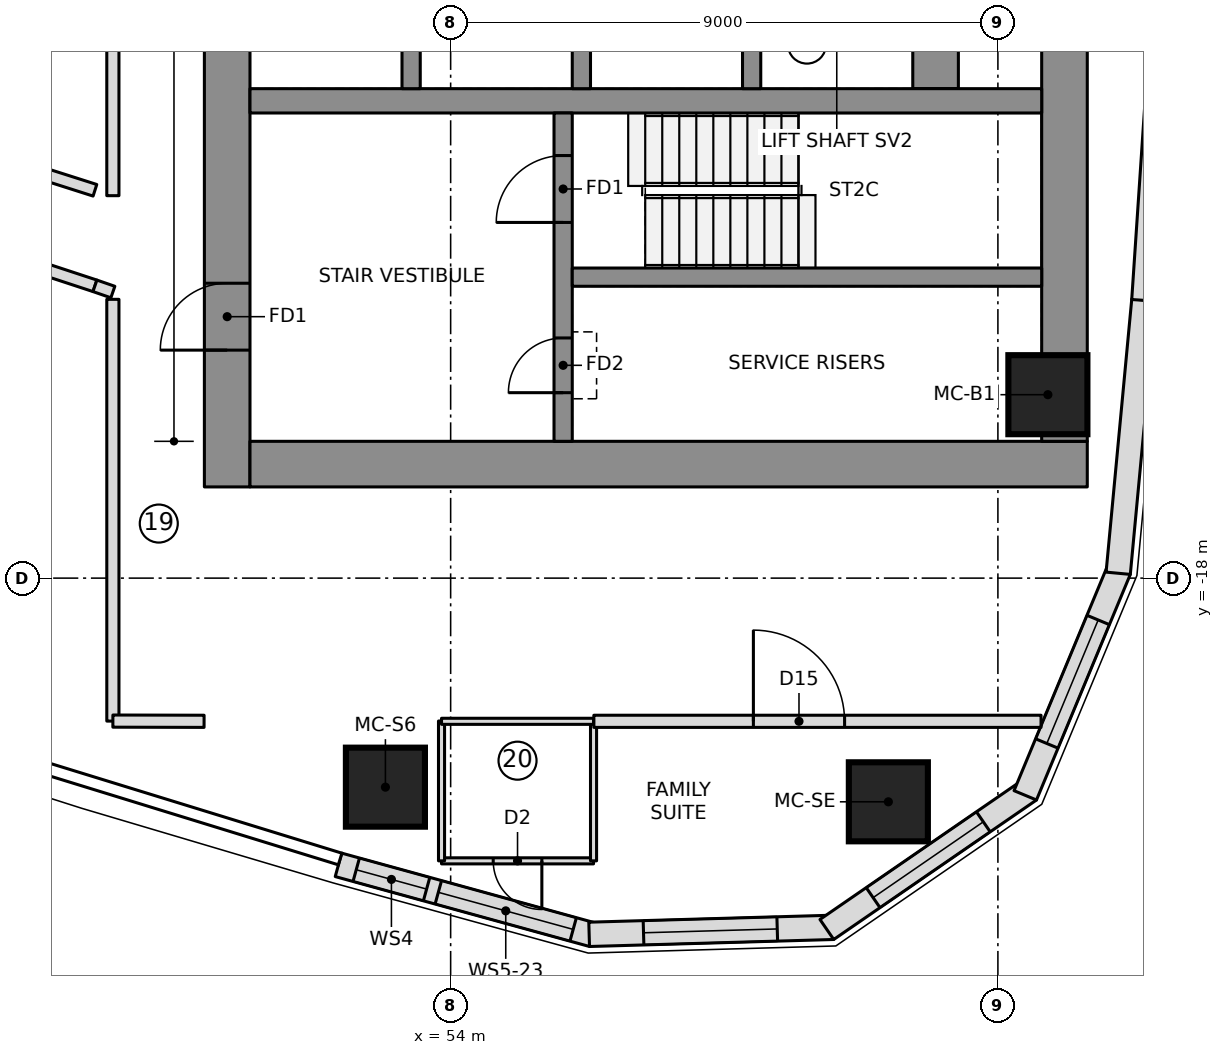
"""IFC4 building model, lengths in metres.
Left out: names, types, materials, properties, quantities, classifications, styles, units other than length and angle.
Written with IfcOpenShell. Run it as: python <this file> out.ifc"""

import sys

from ifc_helpers import new_model, si_unit, direction, frame, frame_2d, origin, origin_2d, place, context, subcontext, project, spatial, polyline, rectangle, outline, extrude, element, fill, save


model = new_model("IFC4")
c1 = context("Model", 3, precision=1e-05, world=origin(), true_north=direction((0.0, 1.0)))
c2 = subcontext(c1, "Body", "Model", "MODEL_VIEW")
j1 = project(units=[si_unit("LENGTHUNIT", "METRE"), si_unit("PLANEANGLEUNIT", "RADIAN")], contexts=[c1])
p1 = place(None, origin())
s1 = spatial("IfcSite", under=j1, at=p1, CompositionType="ELEMENT")
p2 = place(p1, origin())
s2 = spatial("IfcBuilding", under=s1, at=p2, CompositionType="ELEMENT")
p3 = place(p2, frame((0.0, 0.0, 175.5)))
s3 = spatial("IfcBuildingStorey", under=s2, at=p3, CompositionType="ELEMENT", Elevation=175.5)
p4 = place(p3, frame((50.325, -16.5, 0.0), z_axis=(0.0, 0.0, 1.0), x_axis=(0.0, 1.0, 0.0)))
e1 = element("IfcWall", 1, at=p4, inside=s3, PredefinedType="SHEAR", context=c2, shape_type="SweptSolid", body=[
    extrude(rectangle(XDim=9.85, YDim=0.75, at=frame_2d((4.925, 0.0))), origin(), (0.0, 0.0, 1.0), 3.55),
])
p5 = place(p4, frame((2.25, 0.0, 0.0)))
e2 = element("IfcOpeningElement", 2, at=p5, cuts=e1, PredefinedType="OPENING", context=c2, shape_type="SweptSolid", body=[
    extrude(rectangle(XDim=1.1, YDim=2.1, at=frame_2d((0.55, 1.05))), frame((0.0, 0.385, 0.0), z_axis=(0.0, -1.0, 0.0), x_axis=(1.0, 0.0, 0.0)), (0.0, 0.0, 1.0), 0.77),
])
p6 = place(p3, frame((50.7, -16.125, 0.0), z_axis=(0.0, 0.0, 1.0), x_axis=(1.0, 0.0, 0.0)))
e3 = element("IfcWall", 3, at=p6, inside=s3, PredefinedType="SHEAR", context=c2, shape_type="SweptSolid", body=[
    extrude(rectangle(XDim=13.77, YDim=0.75, at=frame_2d((6.885, 0.0))), origin(), (0.0, 0.0, 1.0), 3.55),
])
p7 = place(p3, frame((64.095, -15.75, 0.0), z_axis=(0.0, 0.0, 1.0), x_axis=(0.0, 1.0, 0.0)))
e4 = element("IfcWall", 4, at=p7, inside=s3, PredefinedType="SHEAR", context=c2, shape_type="SweptSolid", body=[
    extrude(rectangle(XDim=7.651, YDim=0.75, at=frame_2d((3.825, 0.0))), origin(), (0.0, 0.0, 1.0), 3.55),
])
p8 = place(p3, frame((61.975, -9.95, 0.0), z_axis=(0.0, 0.0, 1.0), x_axis=(0.0, 1.0, 0.0)))
e5 = element("IfcWall", 5, at=p8, inside=s3, PredefinedType="SHEAR", context=c2, shape_type="SweptSolid", body=[
    extrude(rectangle(XDim=19.9, YDim=0.75, at=frame_2d((9.95, 0.0))), origin(), (0.0, 0.0, 1.0), 3.55),
])
p9 = place(p3, frame((50.7, -10.15, 0.0), z_axis=(0.0, 0.0, 1.0), x_axis=(1.0, 0.0, 0.0)))
e6 = element("IfcWall", 6, at=p9, inside=s3, PredefinedType="SHEAR", context=c2, shape_type="SweptSolid", body=[
    extrude(rectangle(XDim=13.02, YDim=0.4, at=frame_2d((6.51, 0.0))), origin(), (0.0, 0.0, 1.0), 3.55),
])
for number, where, z_axis, x_axis in (
    (7, (53.35, -9.95, 0.0), (0.0, 0.0, 1.0), (0.0, 1.0, 0.0)),
    (8, (56.15, -9.95, 0.0), (0.0, 0.0, 1.0), (0.0, 1.0, 0.0)),
    (9, (58.95, -9.95, 0.0), (0.0, 0.0, 1.0), (0.0, 1.0, 0.0)),
):
    element("IfcWall", number, at=place(p3, frame(where, z_axis=z_axis, x_axis=x_axis)), inside=s3, PredefinedType="SHEAR", context=c2, shape_type="SweptSolid", body=[
        extrude(rectangle(XDim=3.0, YDim=0.3, at=frame_2d((1.5, 0.0))), origin(), (0.0, 0.0, 1.0), 3.55),
    ])
p10 = place(p3, frame((55.85, -15.75, 0.0), z_axis=(0.0, 0.0, 1.0), x_axis=(0.0, 1.0, 0.0)))
e10 = element("IfcWall", 10, at=p10, inside=s3, PredefinedType="SHEAR", context=c2, shape_type="SweptSolid", body=[
    extrude(rectangle(XDim=5.4, YDim=0.3, at=frame_2d((2.7, 0.0))), origin(), (0.0, 0.0, 1.0), 3.55),
])
p11 = place(p10, frame((3.6, 0.0, 0.0)))
e11 = element("IfcOpeningElement", 11, at=p11, cuts=e10, PredefinedType="OPENING", context=c2, shape_type="SweptSolid", body=[
    extrude(rectangle(XDim=1.1, YDim=2.1, at=frame_2d((0.55, 1.05))), frame((0.0, 0.16, 0.0), z_axis=(0.0, -1.0, 0.0), x_axis=(1.0, 0.0, 0.0)), (0.0, 0.0, 1.0), 0.32),
])
p12 = place(p10, frame((0.8, 0.0, 0.0)))
e12 = element("IfcOpeningElement", 12, at=p12, cuts=e10, PredefinedType="OPENING", context=c2, shape_type="SweptSolid", body=[
    extrude(rectangle(XDim=0.9, YDim=2.1, at=frame_2d((0.45, 1.05))), frame((0.0, 0.16, 0.0), z_axis=(0.0, -1.0, 0.0), x_axis=(1.0, 0.0, 0.0)), (0.0, 0.0, 1.0), 0.32),
])
p13 = place(p3, frame((56.0, -13.05, 0.0), z_axis=(0.0, 0.0, 1.0), x_axis=(1.0, 0.0, 0.0)))
e13 = element("IfcWall", 13, at=p13, inside=s3, PredefinedType="SHEAR", context=c2, shape_type="SweptSolid", body=[
    extrude(rectangle(XDim=7.72, YDim=0.3, at=frame_2d((3.86, 0.0))), origin(), (0.0, 0.0, 1.0), 3.55),
])
for number, where, z_axis, x_axis in (
    (14, (52.927, -21.438, 0.0), (0.0, 0.0, 1.0), (1.0, 0.0, 0.0)),
    (15, (61.198, -21.679, 0.0), (0.0, 0.0, 1.0), (1.0, 0.0, 0.0)),
    (16, (63.822, -14.983, 0.0), (0.0, 0.0, 1.0), (1.0, 0.0, 0.0)),
):
    element("IfcColumn", number, at=place(p3, frame(where, z_axis=z_axis, x_axis=x_axis)), inside=s3, PredefinedType="COLUMN", context=c2, shape_type="SweptSolid", body=[
        extrude(rectangle(XDim=1.3, YDim=1.3, at=origin_2d()), origin(), (0.0, 0.0, 1.0), 3.55),
    ])
p14 = place(p3, frame((52.155, -22.716, 0.0), z_axis=(0.0, 0.0, 1.0), x_axis=(0.964205755089, -0.265155165617, 0.0)))
e17 = element("IfcWall", 17, at=p14, inside=s3, PredefinedType="NOTDEFINED", context=c2, shape_type="SweptSolid", body=[
    extrude(outline(polyline([(0.0, -0.2), (4.337, -0.2), (4.277, 0.2), (0.0, 0.2), (0.0, -0.2)])), origin(), (0.0, 0.0, 1.0), 3.25),
])
p15 = place(p14, frame((0.303, 0.0, 0.9)))
e18 = element("IfcOpeningElement", 18, at=p15, cuts=e17, PredefinedType="OPENING", context=c2, shape_type="SweptSolid", body=[
    extrude(rectangle(XDim=1.2, YDim=1.8, at=frame_2d((0.6, 0.9))), frame((0.0, 0.21, 0.0), z_axis=(0.0, -1.0, 0.0), x_axis=(1.0, 0.0, 0.0)), (0.0, 0.0, 1.0), 0.42),
])
p16 = place(p14, frame((1.704, 0.0, 0.9)))
e19 = element("IfcOpeningElement", 19, at=p16, cuts=e17, PredefinedType="OPENING", context=c2, shape_type="SweptSolid", body=[
    extrude(rectangle(XDim=2.3, YDim=1.8, at=frame_2d((1.15, 0.9))), frame((0.0, 0.21, 0.0), z_axis=(0.0, -1.0, 0.0), x_axis=(1.0, 0.0, 0.0)), (0.0, 0.0, 1.0), 0.42),
])
p17 = place(p3, frame((56.308, -23.858, 0.0), z_axis=(0.0, 0.0, 1.0), x_axis=(0.999587920197, 0.028705222472, 0.0)))
e20 = element("IfcWall", 20, at=p17, inside=s3, PredefinedType="NOTDEFINED", context=c2, shape_type="SweptSolid", body=[
    extrude(outline(polyline([(-0.03, -0.2), (3.989, -0.2), (3.87, 0.2), (0.03, 0.2), (-0.03, -0.2)])), origin(), (0.0, 0.0, 1.0), 3.25),
])
p18 = place(p17, frame((0.865, 0.0, 0.6)))
e21 = element("IfcOpeningElement", 21, at=p18, cuts=e20, PredefinedType="OPENING", context=c2, shape_type="SweptSolid", body=[
    extrude(outline(polyline([(0.0, 1.35), (0.084, 1.771), (0.322, 2.128), (0.679, 2.366), (1.1, 2.45), (1.521, 2.366), (1.878, 2.128), (2.116, 1.771), (2.2, 1.35), (2.2, 1.1), (2.116, 0.679), (1.878, 0.322), (1.521, 0.084), (1.1, 0.0), (0.679, 0.084), (0.322, 0.322), (0.084, 0.679), (0.0, 1.1), (0.0, 1.35)])), frame((0.0, 0.21, 0.0), z_axis=(0.0, -1.0, 0.0), x_axis=(1.0, 0.0, 0.0)), (0.0, 0.0, 1.0), 0.42),
])
p19 = place(p3, frame((60.236, -23.745, 0.0), z_axis=(0.0, 0.0, 1.0), x_axis=(0.823806162588, 0.566871596115, 0.0)))
e22 = element("IfcWall", 22, at=p19, inside=s3, PredefinedType="NOTDEFINED", context=c2, shape_type="SweptSolid", body=[
    extrude(outline(polyline([(-0.059, -0.2), (3.988, -0.2), (3.87, 0.2), (0.059, 0.2), (-0.059, -0.2)])), origin(), (0.0, 0.0, 1.0), 3.25),
])
p20 = place(p19, frame((0.865, 0.0, 0.6)))
e23 = element("IfcOpeningElement", 23, at=p20, cuts=e22, PredefinedType="OPENING", context=c2, shape_type="SweptSolid", body=[
    extrude(outline(polyline([(0.0, 1.35), (0.084, 1.771), (0.322, 2.128), (0.679, 2.366), (1.1, 2.45), (1.521, 2.366), (1.878, 2.128), (2.116, 1.771), (2.2, 1.35), (2.2, 1.1), (2.116, 0.679), (1.878, 0.322), (1.521, 0.084), (1.1, 0.0), (0.679, 0.084), (0.322, 0.322), (0.084, 0.679), (0.0, 1.1), (0.0, 1.35)])), frame((0.0, 0.21, 0.0), z_axis=(0.0, -1.0, 0.0), x_axis=(1.0, 0.0, 0.0)), (0.0, 0.0, 1.0), 0.42),
])
p21 = place(p3, frame((63.472, -21.518, 0.0), z_axis=(0.0, 0.0, 1.0), x_axis=(0.383997619794, 0.923334082547, 0.0)))
e24 = element("IfcWall", 24, at=p21, inside=s3, PredefinedType="NOTDEFINED", context=c2, shape_type="SweptSolid", body=[
    extrude(outline(polyline([(-0.059, -0.2), (3.959, -0.2), (3.899, 0.2), (0.059, 0.2), (-0.059, -0.2)])), origin(), (0.0, 0.0, 1.0), 3.25),
])
p22 = place(p21, frame((0.865, 0.0, 0.6)))
e25 = element("IfcOpeningElement", 25, at=p22, cuts=e24, PredefinedType="OPENING", context=c2, shape_type="SweptSolid", body=[
    extrude(outline(polyline([(0.0, 1.35), (0.084, 1.771), (0.322, 2.128), (0.679, 2.366), (1.1, 2.45), (1.521, 2.366), (1.878, 2.128), (2.116, 1.771), (2.2, 1.35), (2.2, 1.1), (2.116, 0.679), (1.878, 0.322), (1.521, 0.084), (1.1, 0.0), (0.679, 0.084), (0.322, 0.322), (0.084, 0.679), (0.0, 1.1), (0.0, 1.35)])), frame((0.0, 0.21, 0.0), z_axis=(0.0, -1.0, 0.0), x_axis=(1.0, 0.0, 0.0)), (0.0, 0.0, 1.0), 0.42),
])
p23 = place(p3, frame((64.981, -17.89, 0.0), z_axis=(0.0, 0.0, 1.0), x_axis=(0.093605694738, 0.995609348044, 0.0)))
e26 = element("IfcWall", 26, at=p23, inside=s3, PredefinedType="NOTDEFINED", context=c2, shape_type="SweptSolid", body=[
    extrude(outline(polyline([(-0.03, -0.2), (4.484, -0.2), (4.478, 0.2), (0.03, 0.2), (-0.03, -0.2)])), origin(), (0.0, 0.0, 1.0), 3.25),
])
p24 = place(p3, frame((65.401, -13.429, 0.0), z_axis=(0.0, 0.0, 1.0), x_axis=(0.066905935948, 0.997759287471, 0.0)))
e27 = element("IfcWall", 27, at=p24, inside=s3, PredefinedType="NOTDEFINED", context=c2, shape_type="SweptSolid", body=[
    extrude(outline(polyline([(-0.003, -0.2), (4.484, -0.2), (4.478, 0.2), (0.003, 0.2), (-0.003, -0.2)])), origin(), (0.0, 0.0, 1.0), 3.25),
])
p25 = place(p3, frame((56.35, -22.65, 0.0), z_axis=(0.0, 0.0, 1.0), x_axis=(-1.0, 0.0, 0.0)))
e28 = element("IfcWall", 28, at=p25, inside=s3, PredefinedType="PARTITIONING", context=c2, shape_type="SweptSolid", body=[
    extrude(rectangle(XDim=2.5, YDim=0.1, at=frame_2d((1.25, 0.0))), origin(), (0.0, 0.0, 1.0), 3.25),
])
p26 = place(p25, frame((0.85, 0.0, 0.0)))
e29 = element("IfcOpeningElement", 29, at=p26, cuts=e28, PredefinedType="OPENING", context=c2, shape_type="SweptSolid", body=[
    extrude(rectangle(XDim=0.8, YDim=2.1, at=frame_2d((0.4, 1.05))), frame((0.0, 0.06, 0.0), z_axis=(0.0, -1.0, 0.0), x_axis=(1.0, 0.0, 0.0)), (0.0, 0.0, 1.0), 0.12),
])
for number, where, z_axis, x_axis in (
    (30, (53.85, -22.65, 0.0), (0.0, 0.0, 1.0), (0.0, 1.0, 0.0)),
    (31, (56.35, -20.35, 0.0), (0.0, 0.0, 1.0), (0.0, -1.0, 0.0)),
):
    element("IfcWall", number, at=place(p3, frame(where, z_axis=z_axis, x_axis=x_axis)), inside=s3, PredefinedType="PARTITIONING", context=c2, shape_type="SweptSolid", body=[
        extrude(rectangle(XDim=2.3, YDim=0.1, at=frame_2d((1.15, 0.0))), origin(), (0.0, 0.0, 1.0), 3.25),
    ])
p27 = place(p3, frame((56.355, -20.355, 0.0), z_axis=(0.0, 0.0, 1.0), x_axis=(1.0, 0.0, 0.0)))
e32 = element("IfcWall", 32, at=p27, inside=s3, PredefinedType="PARTITIONING", context=c2, shape_type="SweptSolid", body=[
    extrude(rectangle(XDim=7.354, YDim=0.2, at=frame_2d((3.677, 0.0))), origin(), (0.0, 0.0, 1.0), 3.25),
])
p28 = place(p27, frame((2.624, 0.0, 0.0)))
e33 = element("IfcOpeningElement", 33, at=p28, cuts=e32, PredefinedType="OPENING", context=c2, shape_type="SweptSolid", body=[
    extrude(rectangle(XDim=1.5, YDim=2.1, at=frame_2d((0.75, 1.05))), frame((0.0, 0.11, 0.0), z_axis=(0.0, -1.0, 0.0), x_axis=(1.0, 0.0, 0.0)), (0.0, 0.0, 1.0), 0.22),
])
p29 = place(p3, frame((53.85, -20.355, 0.0), z_axis=(0.0, 0.0, 1.0), x_axis=(1.0, 0.0, 0.0)))
e34 = element("IfcWall", 34, at=p29, inside=s3, PredefinedType="PARTITIONING", context=c2, shape_type="SweptSolid", body=[
    extrude(rectangle(XDim=2.5, YDim=0.1, at=frame_2d((1.25, 0.0))), origin(), (0.0, 0.0, 1.0), 3.25),
])
p30 = place(p3, frame((43.026, -11.507, 0.0), z_axis=(0.0, 0.0, 1.0), x_axis=(0.949951949432, -0.312396052744, 0.0)))
e35 = element("IfcWall", 35, at=p30, inside=s3, PredefinedType="PARTITIONING", context=c2, shape_type="SweptSolid", body=[
    extrude(rectangle(XDim=5.394, YDim=0.2, at=frame_2d((2.697, 0.0))), origin(), (0.0, 0.0, 1.0), 3.25),
])
p31 = place(p30, frame((3.05, 0.0, 0.0)))
e36 = element("IfcOpeningElement", 36, at=p31, cuts=e35, PredefinedType="OPENING", context=c2, shape_type="SweptSolid", body=[
    extrude(rectangle(XDim=1.0, YDim=2.1, at=frame_2d((0.5, 1.05))), frame((0.0, 0.11, 0.0), z_axis=(0.0, -1.0, 0.0), x_axis=(1.0, 0.0, 0.0)), (0.0, 0.0, 1.0), 0.22),
])
p32 = place(p3, frame((48.15, -11.621, 0.0), z_axis=(0.0, 0.0, 1.0), x_axis=(-0.952761948983, 0.303718074157, 0.0)))
e37 = element("IfcWall", 37, at=p32, inside=s3, PredefinedType="PARTITIONING", context=c2, shape_type="SweptSolid", body=[
    extrude(rectangle(XDim=1.332, YDim=0.2, at=frame_2d((0.666, 0.0))), origin(), (0.0, 0.0, 1.0), 3.25),
])
p33 = place(p3, frame((48.445, 11.71, 0.0), z_axis=(0.0, 0.0, 1.0), x_axis=(0.0, -1.0, 0.0)))
e38 = element("IfcWall", 38, at=p33, inside=s3, PredefinedType="PARTITIONING", context=c2, shape_type="SweptSolid", body=[
    extrude(rectangle(XDim=23.42, YDim=0.2, at=frame_2d((11.71, 0.0))), origin(), (0.0, 0.0, 1.0), 3.25),
])
p34 = place(p3, frame((48.15, -13.192, 0.0), z_axis=(0.0, 0.0, 1.0), x_axis=(0.944623214561, -0.328156947987, 0.0)))
e39 = element("IfcWall", 39, at=p34, inside=s3, PredefinedType="PARTITIONING", context=c2, shape_type="SweptSolid", body=[
    extrude(rectangle(XDim=0.312, YDim=0.2, at=frame_2d((0.156, 0.0))), origin(), (0.0, 0.0, 1.0), 3.25),
])
p35 = place(p3, frame((48.445, -13.415, 0.0), z_axis=(0.0, 0.0, 1.0), x_axis=(3.5195157e-05, -0.999999999381, 0.0)))
e40 = element("IfcWall", 40, at=p35, inside=s3, PredefinedType="PARTITIONING", context=c2, shape_type="SweptSolid", body=[
    extrude(rectangle(XDim=6.937, YDim=0.2, at=frame_2d((3.468, 0.0))), origin(), (0.0, 0.0, 1.0), 3.25),
])
p36 = place(p3, frame((48.445, -20.352, 0.0), z_axis=(0.0, 0.0, 1.0), x_axis=(0.999997403051, -0.002279010849, 0.0)))
e41 = element("IfcWall", 41, at=p36, inside=s3, PredefinedType="PARTITIONING", context=c2, shape_type="SweptSolid", body=[
    extrude(rectangle(XDim=1.5, YDim=0.2, at=frame_2d((0.75, 0.0))), origin(), (0.0, 0.0, 1.0), 3.25),
])
p37 = place(p15, origin())
e42 = element("IfcWindow", 42, at=p37, inside=s3, PartitioningType="SINGLE_PANEL", PredefinedType="WINDOW", context=c2, shape_type="SweptSolid", body=[
    extrude(rectangle(XDim=1.2, YDim=1.8, at=frame_2d((0.6, 0.9))), frame((0.0, 0.17, 0.0), z_axis=(0.0, -1.0, 0.0), x_axis=(1.0, 0.0, 0.0)), (0.0, 0.0, 1.0), 0.06),
])
fill(e18, e42)
p38 = place(p16, origin())
e43 = element("IfcWindow", 43, at=p38, inside=s3, PartitioningType="SINGLE_PANEL", PredefinedType="WINDOW", context=c2, shape_type="SweptSolid", body=[
    extrude(rectangle(XDim=2.3, YDim=1.8, at=frame_2d((1.15, 0.9))), frame((0.0, 0.17, 0.0), z_axis=(0.0, -1.0, 0.0), x_axis=(1.0, 0.0, 0.0)), (0.0, 0.0, 1.0), 0.06),
])
fill(e19, e43)
p39 = place(p18, origin())
e44 = element("IfcWindow", 44, at=p39, inside=s3, PartitioningType="SINGLE_PANEL", PredefinedType="WINDOW", context=c2, shape_type="SweptSolid", body=[
    extrude(outline(polyline([(0.0, 1.35), (0.084, 1.771), (0.322, 2.128), (0.679, 2.366), (1.1, 2.45), (1.521, 2.366), (1.878, 2.128), (2.116, 1.771), (2.2, 1.35), (2.2, 1.1), (2.116, 0.679), (1.878, 0.322), (1.521, 0.084), (1.1, 0.0), (0.679, 0.084), (0.322, 0.322), (0.084, 0.679), (0.0, 1.1), (0.0, 1.35)])), frame((0.0, 0.17, 0.0), z_axis=(0.0, -1.0, 0.0), x_axis=(1.0, 0.0, 0.0)), (0.0, 0.0, 1.0), 0.06),
])
fill(e21, e44)
p40 = place(p20, origin())
e45 = element("IfcWindow", 45, at=p40, inside=s3, PartitioningType="SINGLE_PANEL", PredefinedType="WINDOW", context=c2, shape_type="SweptSolid", body=[
    extrude(outline(polyline([(0.0, 1.35), (0.084, 1.771), (0.322, 2.128), (0.679, 2.366), (1.1, 2.45), (1.521, 2.366), (1.878, 2.128), (2.116, 1.771), (2.2, 1.35), (2.2, 1.1), (2.116, 0.679), (1.878, 0.322), (1.521, 0.084), (1.1, 0.0), (0.679, 0.084), (0.322, 0.322), (0.084, 0.679), (0.0, 1.1), (0.0, 1.35)])), frame((0.0, 0.17, 0.0), z_axis=(0.0, -1.0, 0.0), x_axis=(1.0, 0.0, 0.0)), (0.0, 0.0, 1.0), 0.06),
])
fill(e23, e45)
p41 = place(p22, origin())
e46 = element("IfcWindow", 46, at=p41, inside=s3, PartitioningType="SINGLE_PANEL", PredefinedType="WINDOW", context=c2, shape_type="SweptSolid", body=[
    extrude(outline(polyline([(0.0, 1.35), (0.084, 1.771), (0.322, 2.128), (0.679, 2.366), (1.1, 2.45), (1.521, 2.366), (1.878, 2.128), (2.116, 1.771), (2.2, 1.35), (2.2, 1.1), (2.116, 0.679), (1.878, 0.322), (1.521, 0.084), (1.1, 0.0), (0.679, 0.084), (0.322, 0.322), (0.084, 0.679), (0.0, 1.1), (0.0, 1.35)])), frame((0.0, 0.17, 0.0), z_axis=(0.0, -1.0, 0.0), x_axis=(1.0, 0.0, 0.0)), (0.0, 0.0, 1.0), 0.06),
])
fill(e25, e46)
p42 = place(p26, origin())
e47 = element("IfcDoor", 47, at=p42, inside=s3, OperationType="SINGLE_SWING_LEFT", PredefinedType="DOOR", context=c2, shape_type="SweptSolid", body=[
    extrude(rectangle(XDim=0.8, YDim=2.1, at=frame_2d((0.4, 1.05))), frame((0.0, 0.025, 0.0), z_axis=(0.0, -1.0, 0.0), x_axis=(1.0, 0.0, 0.0)), (0.0, 0.0, 1.0), 0.05),
])
fill(e29, e47)
p43 = place(p28, origin())
e48 = element("IfcDoor", 48, at=p43, inside=s3, OperationType="DOUBLE_DOOR_SINGLE_SWING", PredefinedType="DOOR", context=c2, shape_type="SweptSolid", body=[
    extrude(rectangle(XDim=1.5, YDim=2.1, at=frame_2d((0.75, 1.05))), frame((0.0, 0.025, 0.0), z_axis=(0.0, -1.0, 0.0), x_axis=(1.0, 0.0, 0.0)), (0.0, 0.0, 1.0), 0.05),
])
fill(e33, e48)
p44 = place(p11, origin())
e49 = element("IfcDoor", 49, at=p44, inside=s3, OperationType="SINGLE_SWING_RIGHT", PredefinedType="DOOR", context=c2, shape_type="SweptSolid", body=[
    extrude(rectangle(XDim=1.1, YDim=2.1, at=frame_2d((0.55, 1.05))), frame((0.0, 0.025, 0.0), z_axis=(0.0, -1.0, 0.0), x_axis=(1.0, 0.0, 0.0)), (0.0, 0.0, 1.0), 0.05),
])
fill(e11, e49)
p45 = place(p5, origin())
e50 = element("IfcDoor", 50, at=p45, inside=s3, OperationType="SINGLE_SWING_RIGHT", PredefinedType="DOOR", context=c2, shape_type="SweptSolid", body=[
    extrude(rectangle(XDim=1.1, YDim=2.1, at=frame_2d((0.55, 1.05))), frame((0.0, 0.025, 0.0), z_axis=(0.0, -1.0, 0.0), x_axis=(1.0, 0.0, 0.0)), (0.0, 0.0, 1.0), 0.05),
])
fill(e2, e50)
p46 = place(p12, origin())
e51 = element("IfcDoor", 51, at=p46, inside=s3, OperationType="SINGLE_SWING_LEFT", PredefinedType="DOOR", context=c2, shape_type="SweptSolid", body=[
    extrude(rectangle(XDim=0.9, YDim=2.1, at=frame_2d((0.45, 1.05))), frame((0.0, 0.025, 0.0), z_axis=(0.0, -1.0, 0.0), x_axis=(1.0, 0.0, 0.0)), (0.0, 0.0, 1.0), 0.05),
])
fill(e12, e51)
save(model, sys.argv[1])
